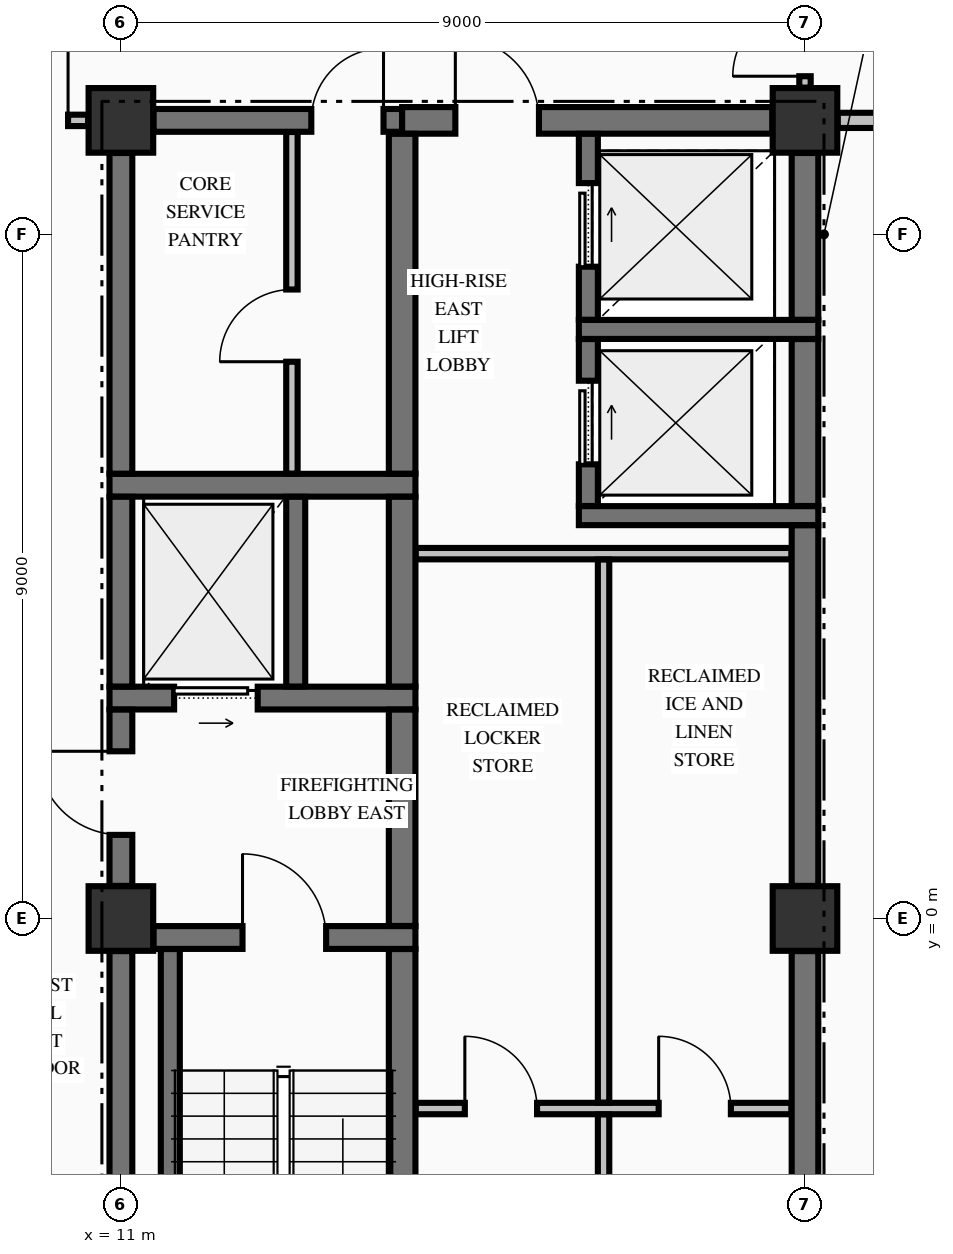
"""IFC4 building model, lengths in metres.
Left out: names, types, materials, properties, quantities, classifications, styles, units other than length and angle.
Written with IfcOpenShell. Run it as: python <this file> out.ifc"""

import sys

from ifc_helpers import new_model, si_unit, direction, frame, frame_2d, origin, origin_2d, place, context, subcontext, project, spatial, rectangle, extrude, element, fill, save


model = new_model("IFC4")
c1 = context("Model", 3, precision=1e-05, world=origin(), true_north=direction((0.0, 1.0)))
c2 = subcontext(c1, "Body", "Model", "MODEL_VIEW")
j1 = project(units=[si_unit("LENGTHUNIT", "METRE"), si_unit("PLANEANGLEUNIT", "RADIAN")], contexts=[c1])
p1 = place(None, origin())
s1 = spatial("IfcSite", under=j1, at=p1, CompositionType="ELEMENT")
p2 = place(p1, origin())
s2 = spatial("IfcBuilding", under=s1, at=p2, CompositionType="ELEMENT")
p3 = place(p2, frame((0.0, 0.0, 186.46)))
s3 = spatial("IfcBuildingStorey", under=s2, at=p3, CompositionType="ELEMENT", Elevation=186.46)
for number, where, z_axis, x_axis in (
    (1, (11.0, 0.0, -0.425), (0.0, 0.0, 1.0), (1.0, 0.0, 0.0)),
    (2, (11.0, 10.5, -0.425), (0.0, 0.0, 1.0), (1.0, 0.0, 0.0)),
    (3, (20.0, 10.5, -0.425), (0.0, 0.0, 1.0), (1.0, 0.0, 0.0)),
    (4, (20.0, 0.0, -0.425), (0.0, 0.0, 1.0), (1.0, 0.0, 0.0)),
):
    element("IfcColumn", number, at=place(p3, frame(where, z_axis=z_axis, x_axis=x_axis)), inside=s3, PredefinedType="COLUMN", context=c2, shape_type="SweptSolid", body=[
        extrude(rectangle(XDim=0.85, YDim=0.85, at=origin_2d()), origin(), (0.0, 0.0, 1.0), 5.0),
    ])
p4 = place(p3, frame((11.429, -0.25, 0.0), z_axis=(0.0, 0.0, 1.0), x_axis=(1.0, 0.0, 0.0)))
e5 = element("IfcWall", 5, at=p4, inside=s3, PredefinedType="SHEAR", context=c2, shape_type="SweptSolid", body=[
    extrude(rectangle(XDim=3.446, YDim=0.3, at=frame_2d((1.723, 0.0))), origin(), (0.0, 0.0, 1.0), 4.575),
])
p5 = place(p4, frame((1.171, 0.0, 0.0)))
e6 = element("IfcOpeningElement", 6, at=p5, cuts=e5, PredefinedType="OPENING", context=c2, shape_type="SweptSolid", body=[
    extrude(rectangle(XDim=1.1, YDim=2.15, at=frame_2d((0.55, 1.075))), frame((0.0, 0.16, 0.0), z_axis=(0.0, -1.0, 0.0), x_axis=(1.0, 0.0, 0.0)), (0.0, 0.0, 1.0), 0.32),
])
p6 = place(p3, frame((10.85, 2.9, 0.0), z_axis=(0.0, 0.0, 1.0), x_axis=(1.0, 0.0, 0.0)))
e7 = element("IfcWall", 7, at=p6, inside=s3, PredefinedType="SHEAR", context=c2, shape_type="SweptSolid", body=[
    extrude(rectangle(XDim=4.025, YDim=0.3, at=frame_2d((2.012, 0.0))), origin(), (0.0, 0.0, 1.0), 4.575),
])
p7 = place(p6, frame((0.85, 0.0, 0.0)))
e8 = element("IfcOpeningElement", 8, at=p7, cuts=e7, PredefinedType="OPENING", context=c2, shape_type="SweptSolid", body=[
    extrude(rectangle(XDim=1.1, YDim=2.2, at=frame_2d((0.55, 1.1))), frame((0.0, 0.16, 0.0), z_axis=(0.0, -1.0, 0.0), x_axis=(1.0, 0.0, 0.0)), (0.0, 0.0, 1.0), 0.32),
])
p8 = place(p3, frame((17.025, 5.3, 0.0), z_axis=(0.0, 0.0, 1.0), x_axis=(1.0, 0.0, 0.0)))
e9 = element("IfcWall", 9, at=p8, inside=s3, PredefinedType="SOLIDWALL", context=c2, shape_type="SweptSolid", body=[
    extrude(rectangle(XDim=3.15, YDim=0.25, at=frame_2d((1.575, 0.0))), origin(), (0.0, 0.0, 1.0), 4.575),
])
p9 = place(p3, frame((10.85, 5.7, 0.0), z_axis=(0.0, 0.0, 1.0), x_axis=(1.0, 0.0, 0.0)))
e10 = element("IfcWall", 10, at=p9, inside=s3, PredefinedType="SHEAR", context=c2, shape_type="SweptSolid", body=[
    extrude(rectangle(XDim=4.025, YDim=0.3, at=frame_2d((2.012, 0.0))), origin(), (0.0, 0.0, 1.0), 4.575),
])
p10 = place(p3, frame((17.025, 7.75, 0.0), z_axis=(0.0, 0.0, 1.0), x_axis=(1.0, 0.0, 0.0)))
e11 = element("IfcWall", 11, at=p10, inside=s3, PredefinedType="SOLIDWALL", context=c2, shape_type="SweptSolid", body=[
    extrude(rectangle(XDim=3.15, YDim=0.25, at=frame_2d((1.575, 0.0))), origin(), (0.0, 0.0, 1.0), 4.575),
])
p11 = place(p3, frame((11.429, 10.5, 0.0), z_axis=(0.0, 0.0, 1.0), x_axis=(1.0, 0.0, 0.0)))
e12 = element("IfcWall", 12, at=p11, inside=s3, PredefinedType="SHEAR", context=c2, shape_type="SweptSolid", body=[
    extrude(rectangle(XDim=3.271, YDim=0.3, at=frame_2d((1.635, 0.0))), origin(), (0.0, 0.0, 1.0), 4.575),
])
p12 = place(p11, frame((2.076, 0.0, 0.0)))
e13 = element("IfcOpeningElement", 13, at=p12, cuts=e12, PredefinedType="OPENING", context=c2, shape_type="SweptSolid", body=[
    extrude(rectangle(XDim=0.95, YDim=2.15, at=frame_2d((0.475, 1.075))), frame((0.0, 0.16, 0.0), z_axis=(0.0, -1.0, 0.0), x_axis=(1.0, 0.0, 0.0)), (0.0, 0.0, 1.0), 0.32),
])
p13 = place(p3, frame((14.7, 10.5, 0.0), z_axis=(0.0, 0.0, 1.0), x_axis=(1.0, 0.0, 0.0)))
e14 = element("IfcWall", 14, at=p13, inside=s3, PredefinedType="SHEAR", context=c2, shape_type="SweptSolid", body=[
    extrude(rectangle(XDim=4.871, YDim=0.35, at=frame_2d((2.436, 0.0))), origin(), (0.0, 0.0, 1.0), 4.575),
])
p14 = place(p13, frame((0.7, 0.0, 0.0)))
e15 = element("IfcOpeningElement", 15, at=p14, cuts=e14, PredefinedType="OPENING", context=c2, shape_type="SweptSolid", body=[
    extrude(rectangle(XDim=1.1, YDim=2.15, at=frame_2d((0.55, 1.075))), frame((0.0, 0.185, 0.0), z_axis=(0.0, -1.0, 0.0), x_axis=(1.0, 0.0, 0.0)), (0.0, 0.0, 1.0), 0.37),
])
p15 = place(p3, frame((14.878, -2.5, 0.0), z_axis=(0.0, 0.0, 1.0), x_axis=(1.0, 0.0, 0.0)))
e16 = element("IfcWall", 16, at=p15, inside=s3, PredefinedType="PARTITIONING", context=c2, shape_type="SweptSolid", body=[
    extrude(rectangle(XDim=4.944, YDim=0.15, at=frame_2d((2.472, 0.0))), origin(), (0.0, 0.0, 1.0), 4.575),
])
p16 = place(p15, frame((0.647, 0.0, 0.0)))
e17 = element("IfcOpeningElement", 17, at=p16, cuts=e16, PredefinedType="OPENING", context=c2, shape_type="SweptSolid", body=[
    extrude(rectangle(XDim=0.95, YDim=2.15, at=frame_2d((0.475, 1.075))), frame((0.0, 0.085, 0.0), z_axis=(0.0, -1.0, 0.0), x_axis=(1.0, 0.0, 0.0)), (0.0, 0.0, 1.0), 0.17),
])
p17 = place(p15, frame((3.197, 0.0, 0.0)))
e18 = element("IfcOpeningElement", 18, at=p17, cuts=e16, PredefinedType="OPENING", context=c2, shape_type="SweptSolid", body=[
    extrude(rectangle(XDim=0.95, YDim=2.15, at=frame_2d((0.475, 1.075))), frame((0.0, 0.085, 0.0), z_axis=(0.0, -1.0, 0.0), x_axis=(1.0, 0.0, 0.0)), (0.0, 0.0, 1.0), 0.17),
])
p18 = place(p3, frame((14.878, 4.8, 0.0), z_axis=(0.0, 0.0, 1.0), x_axis=(1.0, 0.0, 0.0)))
e19 = element("IfcWall", 19, at=p18, inside=s3, PredefinedType="PARTITIONING", context=c2, shape_type="SweptSolid", body=[
    extrude(rectangle(XDim=4.944, YDim=0.15, at=frame_2d((2.472, 0.0))), origin(), (0.0, 0.0, 1.0), 4.575),
])
p19 = place(p3, frame((-10.569, 10.5, 0.0), z_axis=(0.0, 0.0, 1.0), x_axis=(1.0, 0.0, 0.0)))
e20 = element("IfcWall", 20, at=p19, inside=s3, PredefinedType="PARTITIONING", context=c2, shape_type="SweptSolid", body=[
    extrude(rectangle(XDim=21.138, YDim=0.15, at=frame_2d((10.569, 0.0))), origin(), (0.0, 0.0, 1.0), 4.575),
])
p20 = place(p19, frame((0.264, 0.0, 0.0)))
e21 = element("IfcOpeningElement", 21, at=p20, cuts=e20, PredefinedType="OPENING", context=c2, shape_type="SweptSolid", body=[
    extrude(rectangle(XDim=1.05, YDim=2.15, at=frame_2d((0.525, 1.075))), frame((0.0, 0.085, 0.0), z_axis=(0.0, -1.0, 0.0), x_axis=(1.0, 0.0, 0.0)), (0.0, 0.0, 1.0), 0.17),
])
p21 = place(p19, frame((19.824, 0.0, 0.0)))
e22 = element("IfcOpeningElement", 22, at=p21, cuts=e20, PredefinedType="OPENING", context=c2, shape_type="SweptSolid", body=[
    extrude(rectangle(XDim=1.05, YDim=2.15, at=frame_2d((0.525, 1.075))), frame((0.0, 0.085, 0.0), z_axis=(0.0, -1.0, 0.0), x_axis=(1.0, 0.0, 0.0)), (0.0, 0.0, 1.0), 0.17),
])
p22 = place(p3, frame((20.431, 10.5, 0.0), z_axis=(0.0, 0.0, 1.0), x_axis=(1.0, 0.0, 0.0)))
e23 = element("IfcWall", 23, at=p22, inside=s3, PredefinedType="PARTITIONING", context=c2, shape_type="SweptSolid", body=[
    extrude(rectangle(XDim=6.404, YDim=0.2, at=frame_2d((3.202, 0.0))), origin(), (0.0, 0.0, 1.0), 4.575),
])
p23 = place(p22, frame((2.594, 0.0, 0.0)))
e24 = element("IfcOpeningElement", 24, at=p23, cuts=e23, PredefinedType="OPENING", context=c2, shape_type="SweptSolid", body=[
    extrude(rectangle(XDim=0.95, YDim=2.15, at=frame_2d((0.475, 1.075))), frame((0.0, 0.11, 0.0), z_axis=(0.0, -1.0, 0.0), x_axis=(1.0, 0.0, 0.0)), (0.0, 0.0, 1.0), 0.22),
])
p24 = place(p3, frame((11.0, -9.521, 0.0), z_axis=(0.0, 0.0, 1.0), x_axis=(0.0, 1.0, 0.0)))
e25 = element("IfcWall", 25, at=p24, inside=s3, PredefinedType="SHEAR", context=c2, shape_type="SweptSolid", body=[
    extrude(rectangle(XDim=9.092, YDim=0.3, at=frame_2d((4.546, 0.0))), origin(), (0.0, 0.0, 1.0), 4.575),
])
p25 = place(p3, frame((11.0, 0.429, 0.0), z_axis=(0.0, 0.0, 1.0), x_axis=(0.0, 1.0, 0.0)))
e26 = element("IfcWall", 26, at=p25, inside=s3, PredefinedType="SHEAR", context=c2, shape_type="SweptSolid", body=[
    extrude(rectangle(XDim=2.319, YDim=0.3, at=frame_2d((1.16, 0.0))), origin(), (0.0, 0.0, 1.0), 4.575),
])
p26 = place(p25, frame((0.671, 0.0, 0.0)))
e27 = element("IfcOpeningElement", 27, at=p26, cuts=e26, PredefinedType="OPENING", context=c2, shape_type="SweptSolid", body=[
    extrude(rectangle(XDim=1.1, YDim=2.15, at=frame_2d((0.55, 1.075))), frame((0.0, 0.16, 0.0), z_axis=(0.0, -1.0, 0.0), x_axis=(1.0, 0.0, 0.0)), (0.0, 0.0, 1.0), 0.32),
])
p27 = place(p3, frame((11.0, 3.052, 0.0), z_axis=(0.0, 0.0, 1.0), x_axis=(0.0, 1.0, 0.0)))
e28 = element("IfcWall", 28, at=p27, inside=s3, PredefinedType="SHEAR", context=c2, shape_type="SweptSolid", body=[
    extrude(rectangle(XDim=2.496, YDim=0.3, at=frame_2d((1.248, 0.0))), origin(), (0.0, 0.0, 1.0), 4.575),
])
p28 = place(p3, frame((11.0, 5.852, 0.0), z_axis=(0.0, 0.0, 1.0), x_axis=(0.0, 1.0, 0.0)))
e29 = element("IfcWall", 29, at=p28, inside=s3, PredefinedType="SHEAR", context=c2, shape_type="SweptSolid", body=[
    extrude(rectangle(XDim=4.219, YDim=0.3, at=frame_2d((2.109, 0.0))), origin(), (0.0, 0.0, 1.0), 4.575),
])
p29 = place(p3, frame((11.65, -9.798, 0.0), z_axis=(0.0, 0.0, 1.0), x_axis=(0.0, 1.0, 0.0)))
e30 = element("IfcWall", 30, at=p29, inside=s3, PredefinedType="SOLIDWALL", context=c2, shape_type="SweptSolid", body=[
    extrude(rectangle(XDim=9.396, YDim=0.25, at=frame_2d((4.698, 0.0))), origin(), (0.0, 0.0, 1.0), 4.575),
])
p30 = place(p3, frame((13.3, 3.052, 0.0), z_axis=(0.0, 0.0, 1.0), x_axis=(0.0, 1.0, 0.0)))
e31 = element("IfcWall", 31, at=p30, inside=s3, PredefinedType="SOLIDWALL", context=c2, shape_type="SweptSolid", body=[
    extrude(rectangle(XDim=2.496, YDim=0.25, at=frame_2d((1.248, 0.0))), origin(), (0.0, 0.0, 1.0), 4.575),
])
p31 = place(p3, frame((14.7, -9.773, 0.0), z_axis=(0.0, 0.0, 1.0), x_axis=(0.0, 1.0, 0.0)))
e32 = element("IfcWall", 32, at=p31, inside=s3, PredefinedType="SHEAR", context=c2, shape_type="SweptSolid", body=[
    extrude(rectangle(XDim=9.371, YDim=0.35, at=frame_2d((4.686, 0.0))), origin(), (0.0, 0.0, 1.0), 4.575),
])
p32 = place(p3, frame((14.7, -0.098, 0.0), z_axis=(0.0, 0.0, 1.0), x_axis=(0.0, 1.0, 0.0)))
e33 = element("IfcWall", 33, at=p32, inside=s3, PredefinedType="SHEAR", context=c2, shape_type="SweptSolid", body=[
    extrude(rectangle(XDim=2.846, YDim=0.35, at=frame_2d((1.423, 0.0))), origin(), (0.0, 0.0, 1.0), 4.575),
])
p33 = place(p3, frame((14.7, 3.052, 0.0), z_axis=(0.0, 0.0, 1.0), x_axis=(0.0, 1.0, 0.0)))
e34 = element("IfcWall", 34, at=p33, inside=s3, PredefinedType="SHEAR", context=c2, shape_type="SweptSolid", body=[
    extrude(rectangle(XDim=2.496, YDim=0.35, at=frame_2d((1.248, 0.0))), origin(), (0.0, 0.0, 1.0), 4.575),
])
p34 = place(p3, frame((14.7, 5.852, 0.0), z_axis=(0.0, 0.0, 1.0), x_axis=(0.0, 1.0, 0.0)))
e35 = element("IfcWall", 35, at=p34, inside=s3, PredefinedType="SHEAR", context=c2, shape_type="SweptSolid", body=[
    extrude(rectangle(XDim=4.471, YDim=0.35, at=frame_2d((2.235, 0.0))), origin(), (0.0, 0.0, 1.0), 4.575),
])
p35 = place(p3, frame((17.15, 5.427, 0.0), z_axis=(0.0, 0.0, 1.0), x_axis=(0.0, 1.0, 0.0)))
e36 = element("IfcWall", 36, at=p35, inside=s3, PredefinedType="SOLIDWALL", context=c2, shape_type="SweptSolid", body=[
    extrude(rectangle(XDim=2.196, YDim=0.25, at=frame_2d((1.098, 0.0))), origin(), (0.0, 0.0, 1.0), 4.575),
])
p36 = place(p35, frame((0.548, 0.0, 0.0)))
e37 = element("IfcOpeningElement", 37, at=p36, cuts=e36, PredefinedType="OPENING", context=c2, shape_type="SweptSolid", body=[
    extrude(rectangle(XDim=1.1, YDim=2.2, at=frame_2d((0.55, 1.1))), frame((0.0, 0.135, 0.0), z_axis=(0.0, -1.0, 0.0), x_axis=(1.0, 0.0, 0.0)), (0.0, 0.0, 1.0), 0.27),
])
p37 = place(p3, frame((17.15, 7.877, 0.0), z_axis=(0.0, 0.0, 1.0), x_axis=(0.0, 1.0, 0.0)))
e38 = element("IfcWall", 38, at=p37, inside=s3, PredefinedType="SOLIDWALL", context=c2, shape_type="SweptSolid", body=[
    extrude(rectangle(XDim=2.446, YDim=0.25, at=frame_2d((1.223, 0.0))), origin(), (0.0, 0.0, 1.0), 4.575),
])
p38 = place(p37, frame((0.698, 0.0, 0.0)))
e39 = element("IfcOpeningElement", 39, at=p38, cuts=e38, PredefinedType="OPENING", context=c2, shape_type="SweptSolid", body=[
    extrude(rectangle(XDim=1.1, YDim=2.2, at=frame_2d((0.55, 1.1))), frame((0.0, 0.135, 0.0), z_axis=(0.0, -1.0, 0.0), x_axis=(1.0, 0.0, 0.0)), (0.0, 0.0, 1.0), 0.27),
])
p39 = place(p3, frame((20.0, -9.521, 0.0), z_axis=(0.0, 0.0, 1.0), x_axis=(0.0, 1.0, 0.0)))
e40 = element("IfcWall", 40, at=p39, inside=s3, PredefinedType="SHEAR", context=c2, shape_type="SweptSolid", body=[
    extrude(rectangle(XDim=9.092, YDim=0.35, at=frame_2d((4.546, 0.0))), origin(), (0.0, 0.0, 1.0), 4.575),
])
p40 = place(p3, frame((20.0, 0.429, 0.0), z_axis=(0.0, 0.0, 1.0), x_axis=(0.0, 1.0, 0.0)))
e41 = element("IfcWall", 41, at=p40, inside=s3, PredefinedType="SHEAR", context=c2, shape_type="SweptSolid", body=[
    extrude(rectangle(XDim=4.744, YDim=0.35, at=frame_2d((2.372, 0.0))), origin(), (0.0, 0.0, 1.0), 4.575),
])
p41 = place(p3, frame((20.0, 5.427, 0.0), z_axis=(0.0, 0.0, 1.0), x_axis=(0.0, 1.0, 0.0)))
e42 = element("IfcWall", 42, at=p41, inside=s3, PredefinedType="SHEAR", context=c2, shape_type="SweptSolid", body=[
    extrude(rectangle(XDim=2.196, YDim=0.35, at=frame_2d((1.098, 0.0))), origin(), (0.0, 0.0, 1.0), 4.575),
])
p42 = place(p3, frame((20.0, 7.877, 0.0), z_axis=(0.0, 0.0, 1.0), x_axis=(0.0, 1.0, 0.0)))
e43 = element("IfcWall", 43, at=p42, inside=s3, PredefinedType="SHEAR", context=c2, shape_type="SweptSolid", body=[
    extrude(rectangle(XDim=2.194, YDim=0.35, at=frame_2d((1.097, 0.0))), origin(), (0.0, 0.0, 1.0), 4.575),
])
p43 = place(p3, frame((13.25, 5.853, 0.0), z_axis=(0.0, 0.0, 1.0), x_axis=(0.0, 1.0, 0.0)))
e44 = element("IfcWall", 44, at=p43, inside=s3, PredefinedType="PARTITIONING", context=c2, shape_type="SweptSolid", body=[
    extrude(rectangle(XDim=4.494, YDim=0.15, at=frame_2d((2.247, 0.0))), origin(), (0.0, 0.0, 1.0), 4.575),
])
p44 = place(p43, frame((1.472, 0.0, 0.0)))
e45 = element("IfcOpeningElement", 45, at=p44, cuts=e44, PredefinedType="OPENING", context=c2, shape_type="SweptSolid", body=[
    extrude(rectangle(XDim=0.95, YDim=2.15, at=frame_2d((0.475, 1.075))), frame((0.0, 0.085, 0.0), z_axis=(0.0, -1.0, 0.0), x_axis=(1.0, 0.0, 0.0)), (0.0, 0.0, 1.0), 0.17),
])
p45 = place(p3, frame((17.35, -9.772, 0.0), z_axis=(0.0, 0.0, 1.0), x_axis=(0.0, 1.0, 0.0)))
e46 = element("IfcWall", 46, at=p45, inside=s3, PredefinedType="PARTITIONING", context=c2, shape_type="SweptSolid", body=[
    extrude(rectangle(XDim=7.194, YDim=0.15, at=frame_2d((3.597, 0.0))), origin(), (0.0, 0.0, 1.0), 4.575),
])
p46 = place(p3, frame((17.35, -2.422, 0.0), z_axis=(0.0, 0.0, 1.0), x_axis=(0.0, 1.0, 0.0)))
e47 = element("IfcWall", 47, at=p46, inside=s3, PredefinedType="PARTITIONING", context=c2, shape_type="SweptSolid", body=[
    extrude(rectangle(XDim=7.144, YDim=0.15, at=frame_2d((3.572, 0.0))), origin(), (0.0, 0.0, 1.0), 4.575),
])
p47 = place(p3, frame((20.0, 10.931, 0.0), z_axis=(0.0, 0.0, 1.0), x_axis=(0.0, 1.0, 0.0)))
e48 = element("IfcWall", 48, at=p47, inside=s3, PredefinedType="PARTITIONING", context=c2, shape_type="SweptSolid", body=[
    extrude(rectangle(XDim=1.516, YDim=0.15, at=frame_2d((0.758, 0.0))), origin(), (0.0, 0.0, 1.0), 3.767),
])
p48 = place(p47, frame((0.15, 0.0, 0.0)))
e49 = element("IfcOpeningElement", 49, at=p48, cuts=e48, PredefinedType="OPENING", context=c2, shape_type="SweptSolid", body=[
    extrude(rectangle(XDim=0.95, YDim=2.02, at=frame_2d((0.475, 1.01))), frame((0.0, 0.085, 0.0), z_axis=(0.0, -1.0, 0.0), x_axis=(1.0, 0.0, 0.0)), (0.0, 0.0, 1.0), 0.17),
])
p49 = place(p5, origin())
e50 = element("IfcDoor", 50, at=p49, inside=s3, OperationType="SINGLE_SWING_LEFT", PredefinedType="DOOR", context=c2, shape_type="SweptSolid", body=[
    extrude(rectangle(XDim=1.1, YDim=2.15, at=frame_2d((0.55, 1.075))), frame((0.0, 0.025, 0.0), z_axis=(0.0, -1.0, 0.0), x_axis=(1.0, 0.0, 0.0)), (0.0, 0.0, 1.0), 0.05),
])
fill(e6, e50)
p50 = place(p26, origin())
e51 = element("IfcDoor", 51, at=p50, inside=s3, OperationType="SINGLE_SWING_RIGHT", PredefinedType="DOOR", context=c2, shape_type="SweptSolid", body=[
    extrude(rectangle(XDim=1.1, YDim=2.15, at=frame_2d((0.55, 1.075))), frame((0.0, 0.025, 0.0), z_axis=(0.0, -1.0, 0.0), x_axis=(1.0, 0.0, 0.0)), (0.0, 0.0, 1.0), 0.05),
])
fill(e27, e51)
p51 = place(p7, origin())
e52 = element("IfcDoor", 52, at=p51, inside=s3, OperationType="SLIDING_TO_RIGHT", PredefinedType="DOOR", context=c2, shape_type="SweptSolid", body=[
    extrude(rectangle(XDim=1.1, YDim=2.2, at=frame_2d((0.55, 1.1))), frame((0.0, 0.025, 0.0), z_axis=(0.0, -1.0, 0.0), x_axis=(1.0, 0.0, 0.0)), (0.0, 0.0, 1.0), 0.05),
])
fill(e8, e52)
p52 = place(p12, origin())
e53 = element("IfcDoor", 53, at=p52, inside=s3, OperationType="SINGLE_SWING_RIGHT", PredefinedType="DOOR", context=c2, shape_type="SweptSolid", body=[
    extrude(rectangle(XDim=0.95, YDim=2.15, at=frame_2d((0.475, 1.075))), frame((0.0, 0.025, 0.0), z_axis=(0.0, -1.0, 0.0), x_axis=(1.0, 0.0, 0.0)), (0.0, 0.0, 1.0), 0.05),
])
fill(e13, e53)
p53 = place(p44, origin())
e54 = element("IfcDoor", 54, at=p53, inside=s3, OperationType="SINGLE_SWING_LEFT", PredefinedType="DOOR", context=c2, shape_type="SweptSolid", body=[
    extrude(rectangle(XDim=0.95, YDim=2.15, at=frame_2d((0.475, 1.075))), frame((0.0, 0.025, 0.0), z_axis=(0.0, -1.0, 0.0), x_axis=(1.0, 0.0, 0.0)), (0.0, 0.0, 1.0), 0.05),
])
fill(e45, e54)
p54 = place(p36, origin())
e55 = element("IfcDoor", 55, at=p54, inside=s3, OperationType="SLIDING_TO_RIGHT", PredefinedType="DOOR", context=c2, shape_type="SweptSolid", body=[
    extrude(rectangle(XDim=1.1, YDim=2.2, at=frame_2d((0.55, 1.1))), frame((0.0, 0.025, 0.0), z_axis=(0.0, -1.0, 0.0), x_axis=(1.0, 0.0, 0.0)), (0.0, 0.0, 1.0), 0.05),
])
fill(e37, e55)
p55 = place(p38, origin())
e56 = element("IfcDoor", 56, at=p55, inside=s3, OperationType="SLIDING_TO_RIGHT", PredefinedType="DOOR", context=c2, shape_type="SweptSolid", body=[
    extrude(rectangle(XDim=1.1, YDim=2.2, at=frame_2d((0.55, 1.1))), frame((0.0, 0.025, 0.0), z_axis=(0.0, -1.0, 0.0), x_axis=(1.0, 0.0, 0.0)), (0.0, 0.0, 1.0), 0.05),
])
fill(e39, e56)
p56 = place(p14, origin())
e57 = element("IfcDoor", 57, at=p56, inside=s3, OperationType="SINGLE_SWING_LEFT", PredefinedType="DOOR", context=c2, shape_type="SweptSolid", body=[
    extrude(rectangle(XDim=1.1, YDim=2.15, at=frame_2d((0.55, 1.075))), frame((0.0, 0.025, 0.0), z_axis=(0.0, -1.0, 0.0), x_axis=(1.0, 0.0, 0.0)), (0.0, 0.0, 1.0), 0.05),
])
fill(e15, e57)
p57 = place(p16, origin())
e58 = element("IfcDoor", 58, at=p57, inside=s3, OperationType="SINGLE_SWING_LEFT", PredefinedType="DOOR", context=c2, shape_type="SweptSolid", body=[
    extrude(rectangle(XDim=0.95, YDim=2.15, at=frame_2d((0.475, 1.075))), frame((0.0, 0.025, 0.0), z_axis=(0.0, -1.0, 0.0), x_axis=(1.0, 0.0, 0.0)), (0.0, 0.0, 1.0), 0.05),
])
fill(e17, e58)
p58 = place(p17, origin())
e59 = element("IfcDoor", 59, at=p58, inside=s3, OperationType="SINGLE_SWING_LEFT", PredefinedType="DOOR", context=c2, shape_type="SweptSolid", body=[
    extrude(rectangle(XDim=0.95, YDim=2.15, at=frame_2d((0.475, 1.075))), frame((0.0, 0.025, 0.0), z_axis=(0.0, -1.0, 0.0), x_axis=(1.0, 0.0, 0.0)), (0.0, 0.0, 1.0), 0.05),
])
fill(e18, e59)
p59 = place(p21, origin())
e60 = element("IfcDoor", 60, at=p59, inside=s3, OperationType="SINGLE_SWING_RIGHT", PredefinedType="DOOR", context=c2, shape_type="SweptSolid", body=[
    extrude(rectangle(XDim=1.05, YDim=2.15, at=frame_2d((0.525, 1.075))), frame((0.0, 0.025, 0.0), z_axis=(0.0, -1.0, 0.0), x_axis=(1.0, 0.0, 0.0)), (0.0, 0.0, 1.0), 0.05),
])
fill(e22, e60)
p60 = place(p48, origin())
e61 = element("IfcDoor", 61, at=p60, inside=s3, OperationType="SINGLE_SWING_LEFT", PredefinedType="DOOR", context=c2, shape_type="SweptSolid", body=[
    extrude(rectangle(XDim=0.95, YDim=2.02, at=frame_2d((0.475, 1.01))), frame((0.0, 0.025, 0.0), z_axis=(0.0, -1.0, 0.0), x_axis=(1.0, 0.0, 0.0)), (0.0, 0.0, 1.0), 0.05),
])
fill(e49, e61)
save(model, sys.argv[1])
